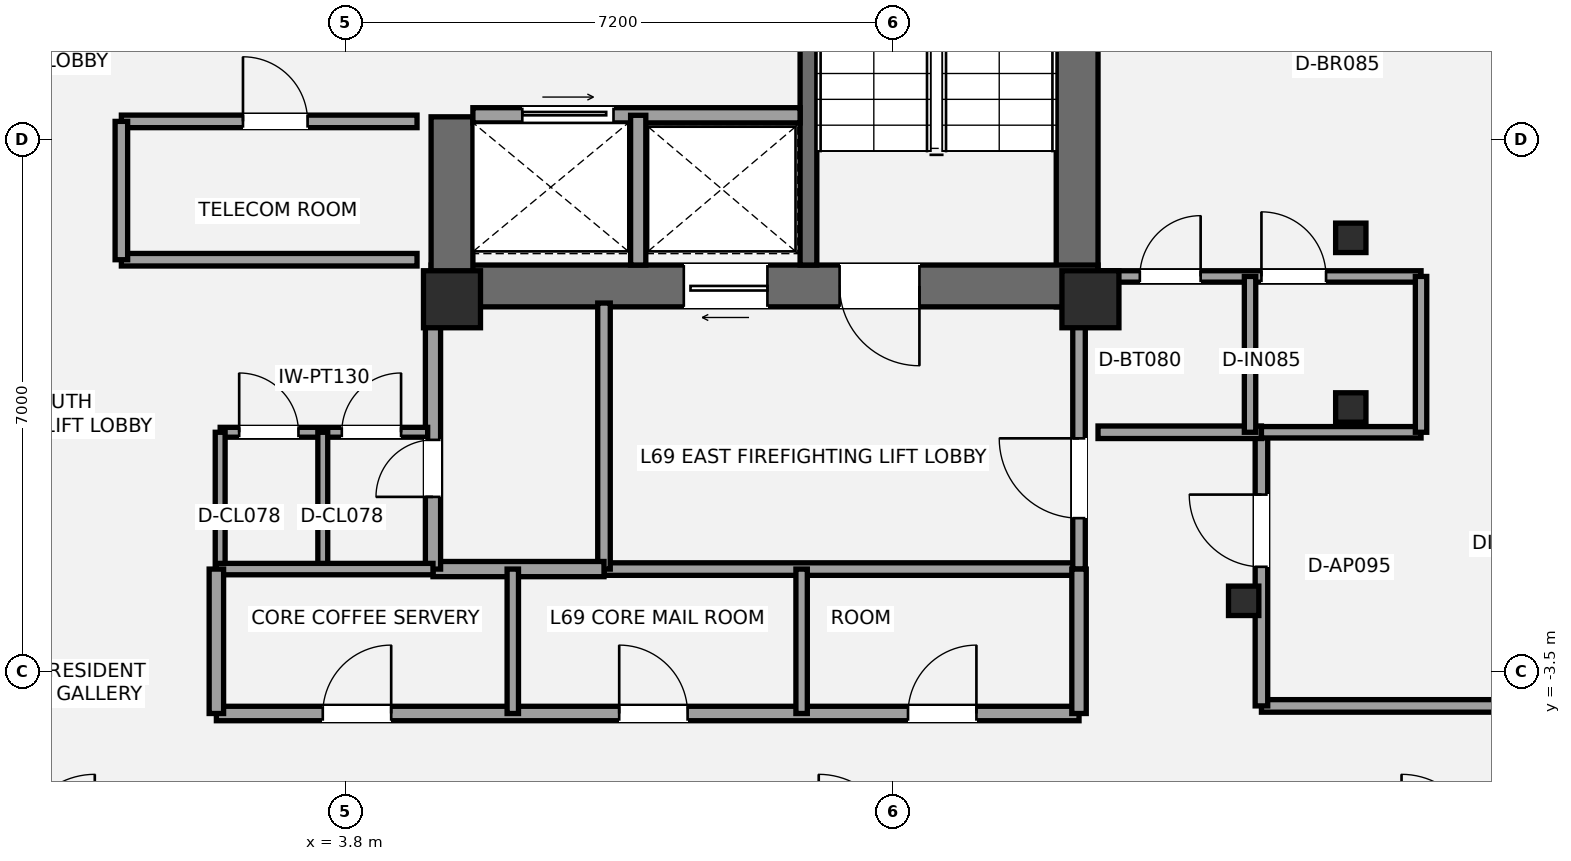
"""IFC4 building model, lengths in metres.
Left out: names, types, materials, properties, quantities, classifications, styles, units other than length and angle.
Written with IfcOpenShell. Run it as: python <this file> out.ifc"""

import sys

from ifc_helpers import new_model, si_unit, direction, frame, frame_2d, origin, origin_2d, place, context, subcontext, project, spatial, rectangle, i_section, extrude, element, fill, save


model = new_model("IFC4")
c1 = context("Model", 3, precision=1e-05, world=origin(), true_north=direction((0.0, 1.0)))
c2 = subcontext(c1, "Body", "Model", "MODEL_VIEW")
j1 = project(units=[si_unit("LENGTHUNIT", "METRE"), si_unit("PLANEANGLEUNIT", "RADIAN")], contexts=[c1])
p1 = place(None, origin())
s1 = spatial("IfcSite", under=j1, at=p1, CompositionType="ELEMENT")
p2 = place(p1, origin())
s2 = spatial("IfcBuilding", under=s1, at=p2, CompositionType="ELEMENT")
p3 = place(p2, frame((0.0, 0.0, 244.65)))
s3 = spatial("IfcBuildingStorey", under=s2, at=p3, CompositionType="ELEMENT", Elevation=244.65)
p4 = place(p3, frame((13.425, 1.3, 0.0), z_axis=(0.0, 0.0, 1.0), x_axis=(0.0, 1.0, 0.0)))
e1 = element("IfcWall", 1, at=p4, inside=s3, PredefinedType="SHEAR", context=c2, shape_type="SweptSolid", body=[
    extrude(rectangle(XDim=8.25, YDim=0.55, at=frame_2d((4.125, 0.0))), origin(), (0.0, 0.0, 1.0), 3.15),
])
p5 = place(p3, frame((13.7, 1.575, 0.0), z_axis=(0.0, 0.0, 1.0), x_axis=(-1.0, 0.0, 0.0)))
e2 = element("IfcWall", 2, at=p5, inside=s3, PredefinedType="SHEAR", context=c2, shape_type="SweptSolid", body=[
    extrude(rectangle(XDim=8.775, YDim=0.55, at=frame_2d((4.387, 0.0))), origin(), (0.0, 0.0, 1.0), 3.15),
])
p6 = place(p5, frame((2.35, 0.0, 0.0)))
e3 = element("IfcOpeningElement", 3, at=p6, cuts=e2, PredefinedType="OPENING", context=c2, shape_type="SweptSolid", body=[
    extrude(rectangle(XDim=1.05, YDim=2.15, at=frame_2d((0.525, 1.075))), frame((0.0, 0.285, 0.0), z_axis=(0.0, -1.0, 0.0), x_axis=(1.0, 0.0, 0.0)), (0.0, 0.0, 1.0), 0.57),
])
p7 = place(p5, frame((4.35, 0.0, 0.0)))
e4 = element("IfcOpeningElement", 4, at=p7, cuts=e2, PredefinedType="OPENING", context=c2, shape_type="SweptSolid", body=[
    extrude(rectangle(XDim=1.1, YDim=2.2, at=frame_2d((0.55, 1.1))), frame((0.0, 0.285, 0.0), z_axis=(0.0, -1.0, 0.0), x_axis=(1.0, 0.0, 0.0)), (0.0, 0.0, 1.0), 0.57),
])
p8 = place(p3, frame((5.2, 1.3, 0.0), z_axis=(0.0, 0.0, 1.0), x_axis=(0.0, 1.0, 0.0)))
e5 = element("IfcWall", 5, at=p8, inside=s3, PredefinedType="SHEAR", context=c2, shape_type="SweptSolid", body=[
    extrude(rectangle(XDim=2.5, YDim=0.55, at=frame_2d((1.25, 0.0))), origin(), (0.0, 0.0, 1.0), 3.15),
])
p9 = place(p3, frame((9.89, 1.85, 0.0), z_axis=(0.0, 0.0, 1.0), x_axis=(0.0, 1.0, 0.0)))
e6 = element("IfcWall", 6, at=p9, inside=s3, PredefinedType="SHEAR", context=c2, shape_type="SweptSolid", body=[
    extrude(rectangle(XDim=7.15, YDim=0.22, at=frame_2d((3.575, 0.0))), origin(), (0.0, 0.0, 1.0), 3.15),
])
for number, where, z_axis, x_axis in (
    (7, (5.2, 1.4, 0.0), (0.0, 0.0, 1.0), (1.0, 0.0, 0.0)),
    (8, (13.6, 1.4, 0.0), (0.0, 0.0, 1.0), (1.0, 0.0, 0.0)),
):
    element("IfcColumn", number, at=place(p3, frame(where, z_axis=z_axis, x_axis=x_axis)), inside=s3, PredefinedType="PILASTER", context=c2, shape_type="SweptSolid", body=[
        extrude(rectangle(XDim=0.75, YDim=0.75, at=origin_2d()), origin(), (0.0, 0.0, 1.0), 3.15),
    ])
for number, where, z_axis, x_axis in (
    (9, (17.026, 2.208, 0.0), (0.0, 0.0, 1.0), (1.0, 0.0, 0.0)),
    (10, (15.616, -2.567, 0.0), (0.0, 0.0, 1.0), (1.0, 0.0, 0.0)),
    (11, (17.026, -0.024, 0.0), (0.0, 0.0, 1.0), (1.0, 0.0, 0.0)),
):
    element("IfcColumn", number, at=place(p3, frame(where, z_axis=z_axis, x_axis=x_axis)), inside=s3, PredefinedType="COLUMN", context=c2, shape_type="SweptSolid", body=[
        extrude(i_section(OverallWidth=0.399, OverallDepth=0.387, WebThickness=0.021, FlangeThickness=0.033, at=origin_2d()), origin(), (0.0, 0.0, 1.0), 3.15),
    ])
p10 = place(p3, frame((7.2, -2.15, 0.0), z_axis=(0.0, 0.0, 1.0), x_axis=(1.0, 0.0, 0.0)))
e12 = element("IfcWall", 12, at=p10, inside=s3, PredefinedType="PARTITIONING", context=c2, shape_type="SweptSolid", body=[
    extrude(rectangle(XDim=6.25, YDim=0.165, at=frame_2d((3.125, 0.0))), origin(), (0.0, 0.0, 1.0), 2.97),
])
p11 = place(p3, frame((7.2, -2.15, 0.0), z_axis=(0.0, 0.0, 1.0), x_axis=(0.0, 1.0, 0.0)))
e13 = element("IfcWall", 13, at=p11, inside=s3, PredefinedType="PARTITIONING", context=c2, shape_type="SweptSolid", body=[
    extrude(rectangle(XDim=3.5, YDim=0.165, at=frame_2d((1.75, 0.0))), origin(), (0.0, 0.0, 1.0), 2.423),
])
p12 = place(p3, frame((13.45, -2.15, 0.0), z_axis=(0.0, 0.0, 1.0), x_axis=(0.0, 1.0, 0.0)))
e14 = element("IfcWall", 14, at=p12, inside=s3, PredefinedType="PARTITIONING", context=c2, shape_type="SweptSolid", body=[
    extrude(rectangle(XDim=3.5, YDim=0.165, at=frame_2d((1.75, 0.0))), origin(), (0.0, 0.0, 1.0), 2.423),
])
p13 = place(p12, frame((0.67, 0.0, 0.0)))
e15 = element("IfcOpeningElement", 15, at=p13, cuts=e14, PredefinedType="OPENING", context=c2, shape_type="SweptSolid", body=[
    extrude(rectangle(XDim=1.05, YDim=2.15, at=frame_2d((0.525, 1.075))), frame((0.0, 0.093, 0.0), z_axis=(0.0, -1.0, 0.0), x_axis=(1.0, 0.0, 0.0)), (0.0, 0.0, 1.0), 0.185),
])
p14 = place(p3, frame((4.95, -2.15, 0.0), z_axis=(0.0, 0.0, 1.0), x_axis=(1.0, 0.0, 0.0)))
e16 = element("IfcWall", 16, at=p14, inside=s3, PredefinedType="SOLIDWALL", context=c2, shape_type="SweptSolid", body=[
    extrude(rectangle(XDim=2.25, YDim=0.2, at=frame_2d((1.125, 0.0))), origin(), (0.0, 0.0, 1.0), 2.97),
])
p15 = place(p3, frame((4.95, -2.15, 0.0), z_axis=(0.0, 0.0, 1.0), x_axis=(0.0, 1.0, 0.0)))
e17 = element("IfcWall", 17, at=p15, inside=s3, PredefinedType="SOLIDWALL", context=c2, shape_type="SweptSolid", body=[
    extrude(rectangle(XDim=3.5, YDim=0.2, at=frame_2d((1.75, 0.0))), origin(), (0.0, 0.0, 1.0), 2.423),
])
p16 = place(p15, frame((0.95, 0.0, 0.0)))
e18 = element("IfcOpeningElement", 18, at=p16, cuts=e17, PredefinedType="OPENING", context=c2, shape_type="SweptSolid", body=[
    extrude(rectangle(XDim=0.75, YDim=2.1, at=frame_2d((0.375, 1.05))), frame((0.0, 0.11, 0.0), z_axis=(0.0, -1.0, 0.0), x_axis=(1.0, 0.0, 0.0)), (0.0, 0.0, 1.0), 0.22),
])
p17 = place(p3, frame((2.15, -0.35, 0.0), z_axis=(0.0, 0.0, 1.0), x_axis=(1.0, 0.0, 0.0)))
e19 = element("IfcWall", 19, at=p17, inside=s3, PredefinedType="PARTITIONING", context=c2, shape_type="SweptSolid", body=[
    extrude(rectangle(XDim=2.73, YDim=0.13, at=frame_2d((1.365, 0.0))), origin(), (0.0, 0.0, 1.0), 2.97),
])
p18 = place(p17, frame((0.25, 0.0, 0.0)))
e20 = element("IfcOpeningElement", 20, at=p18, cuts=e19, PredefinedType="OPENING", context=c2, shape_type="SweptSolid", body=[
    extrude(rectangle(XDim=0.78, YDim=2.1, at=frame_2d((0.39, 1.05))), frame((0.0, 0.075, 0.0), z_axis=(0.0, -1.0, 0.0), x_axis=(1.0, 0.0, 0.0)), (0.0, 0.0, 1.0), 0.15),
])
p19 = place(p17, frame((1.6, 0.0, 0.0)))
e21 = element("IfcOpeningElement", 21, at=p19, cuts=e19, PredefinedType="OPENING", context=c2, shape_type="SweptSolid", body=[
    extrude(rectangle(XDim=0.78, YDim=2.1, at=frame_2d((0.39, 1.05))), frame((0.0, 0.075, 0.0), z_axis=(0.0, -1.0, 0.0), x_axis=(1.0, 0.0, 0.0)), (0.0, 0.0, 1.0), 0.15),
])
for number, where, z_axis, x_axis in (
    (22, (2.15, -2.15, 0.0), (0.0, 0.0, 1.0), (0.0, 1.0, 0.0)),
    (23, (3.5, -2.15, 0.0), (0.0, 0.0, 1.0), (0.0, 1.0, 0.0)),
):
    element("IfcWall", number, at=place(p3, frame(where, z_axis=z_axis, x_axis=x_axis)), inside=s3, PredefinedType="PARTITIONING", context=c2, shape_type="SweptSolid", body=[
        extrude(rectangle(XDim=1.8, YDim=0.13, at=frame_2d((0.9, 0.0))), origin(), (0.0, 0.0, 1.0), 2.97),
    ])
p20 = place(p3, frame((5.475, 3.82, 0.0), z_axis=(0.0, 0.0, 1.0), x_axis=(1.0, 0.0, 0.0)))
e24 = element("IfcWall", 24, at=p20, inside=s3, PredefinedType="SOLIDWALL", context=c2, shape_type="SweptSolid", body=[
    extrude(rectangle(XDim=4.305, YDim=0.2, at=frame_2d((2.152, 0.0))), origin(), (0.0, 0.0, 1.0), 2.97),
])
p21 = place(p20, frame((0.65, 0.0, 0.0)))
e25 = element("IfcOpeningElement", 25, at=p21, cuts=e24, PredefinedType="OPENING", context=c2, shape_type="SweptSolid", body=[
    extrude(rectangle(XDim=1.2, YDim=2.2, at=frame_2d((0.6, 1.1))), frame((0.0, 0.11, 0.0), z_axis=(0.0, -1.0, 0.0), x_axis=(1.0, 0.0, 0.0)), (0.0, 0.0, 1.0), 0.22),
])
p22 = place(p3, frame((7.65, 1.85, 0.0), z_axis=(0.0, 0.0, 1.0), x_axis=(0.0, 1.0, 0.0)))
e26 = element("IfcWall", 26, at=p22, inside=s3, PredefinedType="SOLIDWALL", context=c2, shape_type="SweptSolid", body=[
    extrude(rectangle(XDim=1.97, YDim=0.2, at=frame_2d((0.985, 0.0))), origin(), (0.0, 0.0, 1.0), 2.97),
])
p23 = place(p3, frame((0.85, 1.92, 0.0), z_axis=(0.0, 0.0, 1.0), x_axis=(1.0, 0.0, 0.0)))
e27 = element("IfcWall", 27, at=p23, inside=s3, PredefinedType="PARTITIONING", context=c2, shape_type="SweptSolid", body=[
    extrude(rectangle(XDim=3.89, YDim=0.165, at=frame_2d((1.945, 0.0))), origin(), (0.0, 0.0, 1.0), 2.11),
])
p24 = place(p3, frame((0.85, 3.74, 0.0), z_axis=(0.0, 0.0, 1.0), x_axis=(1.0, 0.0, 0.0)))
e28 = element("IfcWall", 28, at=p24, inside=s3, PredefinedType="PARTITIONING", context=c2, shape_type="SweptSolid", body=[
    extrude(rectangle(XDim=3.89, YDim=0.165, at=frame_2d((1.945, 0.0))), origin(), (0.0, 0.0, 1.0), 2.97),
])
p25 = place(p24, frame((1.6, 0.0, 0.0)))
e29 = element("IfcOpeningElement", 29, at=p25, cuts=e28, PredefinedType="OPENING", context=c2, shape_type="SweptSolid", body=[
    extrude(rectangle(XDim=0.85, YDim=2.1, at=frame_2d((0.425, 1.05))), frame((0.0, 0.093, 0.0), z_axis=(0.0, -1.0, 0.0), x_axis=(1.0, 0.0, 0.0)), (0.0, 0.0, 1.0), 0.185),
])
p26 = place(p3, frame((0.85, 1.92, 0.0), z_axis=(0.0, 0.0, 1.0), x_axis=(0.0, 1.0, 0.0)))
e30 = element("IfcWall", 30, at=p26, inside=s3, PredefinedType="PARTITIONING", context=c2, shape_type="SweptSolid", body=[
    extrude(rectangle(XDim=1.82, YDim=0.165, at=frame_2d((0.91, 0.0))), origin(), (0.0, 0.0, 1.0), 2.97),
])
p27 = place(p3, frame((2.1, -4.05, 0.0), z_axis=(0.0, 0.0, 1.0), x_axis=(1.0, 0.0, 0.0)))
e31 = element("IfcWall", 31, at=p27, inside=s3, PredefinedType="PLUMBINGWALL", context=c2, shape_type="SweptSolid", body=[
    extrude(rectangle(XDim=11.35, YDim=0.19, at=frame_2d((5.675, 0.0))), origin(), (0.0, 0.0, 1.0), 2.357),
])
p28 = place(p27, frame((1.4, 0.0, 0.0)))
e32 = element("IfcOpeningElement", 32, at=p28, cuts=e31, PredefinedType="OPENING", context=c2, shape_type="SweptSolid", body=[
    extrude(rectangle(XDim=0.9, YDim=2.1, at=frame_2d((0.45, 1.05))), frame((0.0, 0.105, 0.0), z_axis=(0.0, -1.0, 0.0), x_axis=(1.0, 0.0, 0.0)), (0.0, 0.0, 1.0), 0.21),
])
p29 = place(p27, frame((5.3, 0.0, 0.0)))
e33 = element("IfcOpeningElement", 33, at=p29, cuts=e31, PredefinedType="OPENING", context=c2, shape_type="SweptSolid", body=[
    extrude(rectangle(XDim=0.9, YDim=2.1, at=frame_2d((0.45, 1.05))), frame((0.0, 0.105, 0.0), z_axis=(0.0, -1.0, 0.0), x_axis=(1.0, 0.0, 0.0)), (0.0, 0.0, 1.0), 0.21),
])
p30 = place(p27, frame((9.1, 0.0, 0.0)))
e34 = element("IfcOpeningElement", 34, at=p30, cuts=e31, PredefinedType="OPENING", context=c2, shape_type="SweptSolid", body=[
    extrude(rectangle(XDim=0.9, YDim=2.1, at=frame_2d((0.45, 1.05))), frame((0.0, 0.105, 0.0), z_axis=(0.0, -1.0, 0.0), x_axis=(1.0, 0.0, 0.0)), (0.0, 0.0, 1.0), 0.21),
])
p31 = place(p3, frame((2.1, -2.15, 0.0), z_axis=(0.0, 0.0, 1.0), x_axis=(1.0, 0.0, 0.0)))
e35 = element("IfcWall", 35, at=p31, inside=s3, PredefinedType="PLUMBINGWALL", context=c2, shape_type="SweptSolid", body=[
    extrude(rectangle(XDim=2.85, YDim=0.15, at=frame_2d((1.425, 0.0))), origin(), (0.0, 0.0, 1.0), 2.423),
])
p32 = place(p3, frame((2.1, -4.05, 0.0), z_axis=(0.0, 0.0, 1.0), x_axis=(0.0, 1.0, 0.0)))
e36 = element("IfcWall", 36, at=p32, inside=s3, PredefinedType="PLUMBINGWALL", context=c2, shape_type="SweptSolid", body=[
    extrude(rectangle(XDim=1.9, YDim=0.19, at=frame_2d((0.95, 0.0))), origin(), (0.0, 0.0, 1.0), 2.97),
])
p33 = place(p3, frame((13.45, -4.05, 0.0), z_axis=(0.0, 0.0, 1.0), x_axis=(0.0, 1.0, 0.0)))
e37 = element("IfcWall", 37, at=p33, inside=s3, PredefinedType="PLUMBINGWALL", context=c2, shape_type="SweptSolid", body=[
    extrude(rectangle(XDim=1.9, YDim=0.19, at=frame_2d((0.95, 0.0))), origin(), (0.0, 0.0, 1.0), 2.423),
])
p34 = place(p3, frame((6.0, -4.05, 0.0), z_axis=(0.0, 0.0, 1.0), x_axis=(0.0, 1.0, 0.0)))
e38 = element("IfcWall", 38, at=p34, inside=s3, PredefinedType="PLUMBINGWALL", context=c2, shape_type="SweptSolid", body=[
    extrude(rectangle(XDim=1.9, YDim=0.15, at=frame_2d((0.95, 0.0))), origin(), (0.0, 0.0, 1.0), 2.431),
])
p35 = place(p3, frame((9.8, -4.05, 0.0), z_axis=(0.0, 0.0, 1.0), x_axis=(0.0, 1.0, 0.0)))
e39 = element("IfcWall", 39, at=p35, inside=s3, PredefinedType="PLUMBINGWALL", context=c2, shape_type="SweptSolid", body=[
    extrude(rectangle(XDim=1.9, YDim=0.15, at=frame_2d((0.95, 0.0))), origin(), (0.0, 0.0, 1.0), 2.97),
])
p36 = place(p3, frame((15.85, -3.95, 0.0), z_axis=(0.0, 0.0, 1.0), x_axis=(1.0, 0.0, 0.0)))
e40 = element("IfcWall", 40, at=p36, inside=s3, PredefinedType="PARTITIONING", context=c2, shape_type="SweptSolid", body=[
    extrude(rectangle(XDim=4.964, YDim=0.165, at=frame_2d((2.482, 0.0))), origin(), (0.0, 0.0, 1.0), 2.423),
])
p37 = place(p3, frame((15.85, -3.95, 0.0), z_axis=(0.0, 0.0, 1.0), x_axis=(0.0, 1.0, 0.0)))
e41 = element("IfcWall", 41, at=p37, inside=s3, PredefinedType="PARTITIONING", context=c2, shape_type="SweptSolid", body=[
    extrude(rectangle(XDim=3.6, YDim=0.165, at=frame_2d((1.8, 0.0))), origin(), (0.0, 0.0, 1.0), 2.357),
])
p38 = place(p37, frame((1.83, 0.0, 0.0)))
e42 = element("IfcOpeningElement", 42, at=p38, cuts=e41, PredefinedType="OPENING", context=c2, shape_type="SweptSolid", body=[
    extrude(rectangle(XDim=0.95, YDim=2.15, at=frame_2d((0.475, 1.075))), frame((0.0, 0.093, 0.0), z_axis=(0.0, -1.0, 0.0), x_axis=(1.0, 0.0, 0.0)), (0.0, 0.0, 1.0), 0.185),
])
p39 = place(p3, frame((13.7, -0.35, 0.0), z_axis=(0.0, 0.0, 1.0), x_axis=(1.0, 0.0, 0.0)))
e43 = element("IfcWall", 43, at=p39, inside=s3, PredefinedType="PARTITIONING", context=c2, shape_type="SweptSolid", body=[
    extrude(rectangle(XDim=2.15, YDim=0.165, at=frame_2d((1.075, 0.0))), origin(), (0.0, 0.0, 1.0), 2.423),
])
p40 = place(p3, frame((13.7, 1.7, 0.0), z_axis=(0.0, 0.0, 1.0), x_axis=(1.0, 0.0, 0.0)))
e44 = element("IfcWall", 44, at=p40, inside=s3, PredefinedType="PLUMBINGWALL", context=c2, shape_type="SweptSolid", body=[
    extrude(rectangle(XDim=4.25, YDim=0.15, at=frame_2d((2.125, 0.0))), origin(), (0.0, 0.0, 1.0), 2.423),
])
p41 = place(p40, frame((0.55, 0.0, 0.0)))
e45 = element("IfcOpeningElement", 45, at=p41, cuts=e44, PredefinedType="OPENING", context=c2, shape_type="SweptSolid", body=[
    extrude(rectangle(XDim=0.8, YDim=2.1, at=frame_2d((0.4, 1.05))), frame((0.0, 0.085, 0.0), z_axis=(0.0, -1.0, 0.0), x_axis=(1.0, 0.0, 0.0)), (0.0, 0.0, 1.0), 0.17),
])
p42 = place(p40, frame((2.15, 0.0, 0.0)))
e46 = element("IfcOpeningElement", 46, at=p42, cuts=e44, PredefinedType="OPENING", context=c2, shape_type="SweptSolid", body=[
    extrude(rectangle(XDim=0.85, YDim=2.1, at=frame_2d((0.425, 1.05))), frame((0.0, 0.085, 0.0), z_axis=(0.0, -1.0, 0.0), x_axis=(1.0, 0.0, 0.0)), (0.0, 0.0, 1.0), 0.17),
])
p43 = place(p3, frame((15.85, -0.35, 0.0), z_axis=(0.0, 0.0, 1.0), x_axis=(1.0, 0.0, 0.0)))
e47 = element("IfcWall", 47, at=p43, inside=s3, PredefinedType="PLUMBINGWALL", context=c2, shape_type="SweptSolid", body=[
    extrude(rectangle(XDim=2.1, YDim=0.15, at=frame_2d((1.05, 0.0))), origin(), (0.0, 0.0, 1.0), 2.423),
])
for number, where, z_axis, x_axis in (
    (48, (15.7, -0.35, 0.0), (0.0, 0.0, 1.0), (0.0, 1.0, 0.0)),
    (49, (17.95, -0.35, 0.0), (0.0, 0.0, 1.0), (0.0, 1.0, 0.0)),
):
    element("IfcWall", number, at=place(p3, frame(where, z_axis=z_axis, x_axis=x_axis)), inside=s3, PredefinedType="PLUMBINGWALL", context=c2, shape_type="SweptSolid", body=[
        extrude(rectangle(XDim=2.05, YDim=0.15, at=frame_2d((1.025, 0.0))), origin(), (0.0, 0.0, 1.0), 2.97),
    ])
p44 = place(p6, origin())
e50 = element("IfcDoor", 50, at=p44, inside=s3, OperationType="SINGLE_SWING_LEFT", PredefinedType="DOOR", context=c2, shape_type="SweptSolid", body=[
    extrude(rectangle(XDim=1.05, YDim=2.15, at=frame_2d((0.525, 1.075))), frame((0.0, 0.025, 0.0), z_axis=(0.0, -1.0, 0.0), x_axis=(1.0, 0.0, 0.0)), (0.0, 0.0, 1.0), 0.05),
])
fill(e3, e50)
p45 = place(p13, origin())
e51 = element("IfcDoor", 51, at=p45, inside=s3, OperationType="SINGLE_SWING_RIGHT", PredefinedType="DOOR", context=c2, shape_type="SweptSolid", body=[
    extrude(rectangle(XDim=1.05, YDim=2.15, at=frame_2d((0.525, 1.075))), frame((0.0, 0.025, 0.0), z_axis=(0.0, -1.0, 0.0), x_axis=(1.0, 0.0, 0.0)), (0.0, 0.0, 1.0), 0.05),
])
fill(e15, e51)
p46 = place(p16, origin())
e52 = element("IfcDoor", 52, at=p46, inside=s3, OperationType="SINGLE_SWING_LEFT", PredefinedType="DOOR", context=c2, shape_type="SweptSolid", body=[
    extrude(rectangle(XDim=0.75, YDim=2.1, at=frame_2d((0.375, 1.05))), frame((0.0, 0.025, 0.0), z_axis=(0.0, -1.0, 0.0), x_axis=(1.0, 0.0, 0.0)), (0.0, 0.0, 1.0), 0.05),
])
fill(e18, e52)
p47 = place(p18, origin())
e53 = element("IfcDoor", 53, at=p47, inside=s3, OperationType="SINGLE_SWING_LEFT", PredefinedType="DOOR", context=c2, shape_type="SweptSolid", body=[
    extrude(rectangle(XDim=0.78, YDim=2.1, at=frame_2d((0.39, 1.05))), frame((0.0, 0.025, 0.0), z_axis=(0.0, -1.0, 0.0), x_axis=(1.0, 0.0, 0.0)), (0.0, 0.0, 1.0), 0.05),
])
fill(e20, e53)
p48 = place(p19, origin())
e54 = element("IfcDoor", 54, at=p48, inside=s3, OperationType="SINGLE_SWING_RIGHT", PredefinedType="DOOR", context=c2, shape_type="SweptSolid", body=[
    extrude(rectangle(XDim=0.78, YDim=2.1, at=frame_2d((0.39, 1.05))), frame((0.0, 0.025, 0.0), z_axis=(0.0, -1.0, 0.0), x_axis=(1.0, 0.0, 0.0)), (0.0, 0.0, 1.0), 0.05),
])
fill(e21, e54)
p49 = place(p7, origin())
e55 = element("IfcDoor", 55, at=p49, inside=s3, OperationType="SLIDING_TO_LEFT", PredefinedType="DOOR", context=c2, shape_type="SweptSolid", body=[
    extrude(rectangle(XDim=1.1, YDim=2.2, at=frame_2d((0.55, 1.1))), frame((0.0, 0.025, 0.0), z_axis=(0.0, -1.0, 0.0), x_axis=(1.0, 0.0, 0.0)), (0.0, 0.0, 1.0), 0.05),
])
fill(e4, e55)
p50 = place(p21, origin())
e56 = element("IfcDoor", 56, at=p50, inside=s3, OperationType="SLIDING_TO_RIGHT", PredefinedType="DOOR", context=c2, shape_type="SweptSolid", body=[
    extrude(rectangle(XDim=1.2, YDim=2.2, at=frame_2d((0.6, 1.1))), frame((0.0, 0.025, 0.0), z_axis=(0.0, -1.0, 0.0), x_axis=(1.0, 0.0, 0.0)), (0.0, 0.0, 1.0), 0.05),
])
fill(e25, e56)
p51 = place(p25, origin())
e57 = element("IfcDoor", 57, at=p51, inside=s3, OperationType="SINGLE_SWING_LEFT", PredefinedType="DOOR", context=c2, shape_type="SweptSolid", body=[
    extrude(rectangle(XDim=0.85, YDim=2.1, at=frame_2d((0.425, 1.05))), frame((0.0, 0.025, 0.0), z_axis=(0.0, -1.0, 0.0), x_axis=(1.0, 0.0, 0.0)), (0.0, 0.0, 1.0), 0.05),
])
fill(e29, e57)
p52 = place(p28, origin())
e58 = element("IfcDoor", 58, at=p52, inside=s3, OperationType="SINGLE_SWING_RIGHT", PredefinedType="DOOR", context=c2, shape_type="SweptSolid", body=[
    extrude(rectangle(XDim=0.9, YDim=2.1, at=frame_2d((0.45, 1.05))), frame((0.0, 0.025, 0.0), z_axis=(0.0, -1.0, 0.0), x_axis=(1.0, 0.0, 0.0)), (0.0, 0.0, 1.0), 0.05),
])
fill(e32, e58)
p53 = place(p29, origin())
e59 = element("IfcDoor", 59, at=p53, inside=s3, OperationType="SINGLE_SWING_LEFT", PredefinedType="DOOR", context=c2, shape_type="SweptSolid", body=[
    extrude(rectangle(XDim=0.9, YDim=2.1, at=frame_2d((0.45, 1.05))), frame((0.0, 0.025, 0.0), z_axis=(0.0, -1.0, 0.0), x_axis=(1.0, 0.0, 0.0)), (0.0, 0.0, 1.0), 0.05),
])
fill(e33, e59)
p54 = place(p30, origin())
e60 = element("IfcDoor", 60, at=p54, inside=s3, OperationType="SINGLE_SWING_RIGHT", PredefinedType="DOOR", context=c2, shape_type="SweptSolid", body=[
    extrude(rectangle(XDim=0.9, YDim=2.1, at=frame_2d((0.45, 1.05))), frame((0.0, 0.025, 0.0), z_axis=(0.0, -1.0, 0.0), x_axis=(1.0, 0.0, 0.0)), (0.0, 0.0, 1.0), 0.05),
])
fill(e34, e60)
p55 = place(p38, origin())
e61 = element("IfcDoor", 61, at=p55, inside=s3, OperationType="SINGLE_SWING_RIGHT", PredefinedType="DOOR", context=c2, shape_type="SweptSolid", body=[
    extrude(rectangle(XDim=0.95, YDim=2.15, at=frame_2d((0.475, 1.075))), frame((0.0, 0.025, 0.0), z_axis=(0.0, -1.0, 0.0), x_axis=(1.0, 0.0, 0.0)), (0.0, 0.0, 1.0), 0.05),
])
fill(e42, e61)
p56 = place(p41, origin())
e62 = element("IfcDoor", 62, at=p56, inside=s3, OperationType="SINGLE_SWING_RIGHT", PredefinedType="DOOR", context=c2, shape_type="SweptSolid", body=[
    extrude(rectangle(XDim=0.8, YDim=2.1, at=frame_2d((0.4, 1.05))), frame((0.0, 0.025, 0.0), z_axis=(0.0, -1.0, 0.0), x_axis=(1.0, 0.0, 0.0)), (0.0, 0.0, 1.0), 0.05),
])
fill(e45, e62)
p57 = place(p42, origin())
e63 = element("IfcDoor", 63, at=p57, inside=s3, OperationType="SINGLE_SWING_LEFT", PredefinedType="DOOR", context=c2, shape_type="SweptSolid", body=[
    extrude(rectangle(XDim=0.85, YDim=2.1, at=frame_2d((0.425, 1.05))), frame((0.0, 0.025, 0.0), z_axis=(0.0, -1.0, 0.0), x_axis=(1.0, 0.0, 0.0)), (0.0, 0.0, 1.0), 0.05),
])
fill(e46, e63)
save(model, sys.argv[1])
